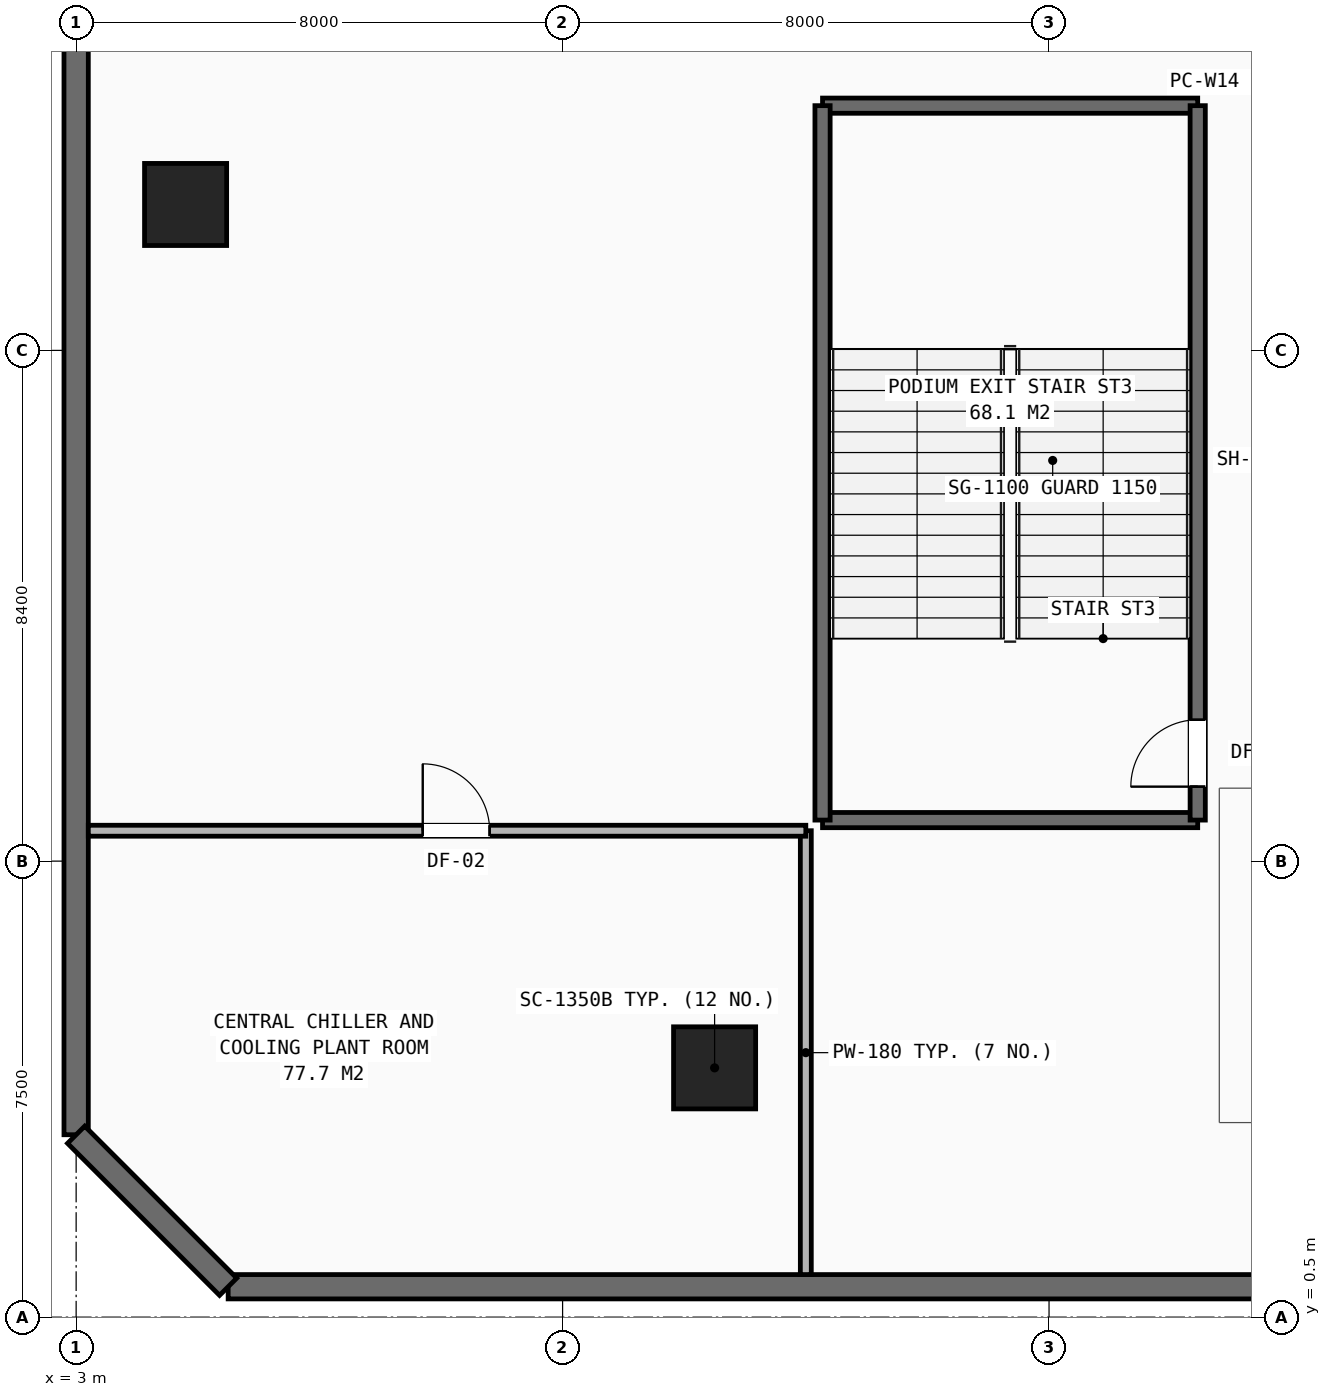
"""IFC4 building model, lengths in metres.
Left out: names, types, materials, properties, quantities, classifications, styles, units other than length and angle.
Written with IfcOpenShell. Run it as: python <this file> out.ifc"""

import sys

from ifc_helpers import new_model, si_unit, direction, frame, frame_2d, origin, origin_2d, place, context, subcontext, project, spatial, rectangle, hollow_rectangle, extrude, element, fill, save


model = new_model("IFC4")
c1 = context("Model", 3, precision=1e-05, world=origin(), true_north=direction((0.0, 1.0)))
c2 = subcontext(c1, "Body", "Model", "MODEL_VIEW")
j1 = project(units=[si_unit("LENGTHUNIT", "METRE"), si_unit("PLANEANGLEUNIT", "RADIAN")], contexts=[c1])
p1 = place(None, origin())
s1 = spatial("IfcSite", under=j1, at=p1, CompositionType="ELEMENT")
p2 = place(p1, origin())
s2 = spatial("IfcBuilding", under=s1, at=p2, CompositionType="ELEMENT")
p3 = place(p2, frame((0.0, 0.0, -10.0)))
s3 = spatial("IfcBuildingStorey", under=s2, at=p3, CompositionType="ELEMENT", Elevation=-10.0)
for number, where, z_axis, x_axis in (
    (1, (13.5, 4.6, 0.0), (0.0, 0.0, 1.0), (1.0, 0.0, 0.0)),
    (2, (4.8, 18.8, 0.0), (0.0, 0.0, 1.0), (1.0, 0.0, 0.0)),
):
    element("IfcColumn", number, at=place(p3, frame(where, z_axis=z_axis, x_axis=x_axis)), inside=s3, PredefinedType="COLUMN", context=c2, shape_type="SweptSolid", body=[
        extrude(hollow_rectangle(XDim=1.35, YDim=1.35, WallThickness=0.085, at=origin_2d()), origin(), (0.0, 0.0, 1.0), 5.0),
    ])
p4 = place(p3, frame((5.5, 1.0, 0.0), z_axis=(0.0, 0.0, 1.0), x_axis=(1.0, 0.0, 0.0)))
e3 = element("IfcWall", 3, at=p4, inside=s3, PredefinedType="USERDEFINED", context=c2, shape_type="SweptSolid", body=[
    extrude(rectangle(XDim=69.0, YDim=0.4, at=frame_2d((34.5, 0.0))), origin(), (0.0, 0.0, 1.0), 4.64),
])
p5 = place(p3, frame((3.0, 51.5, 0.0), z_axis=(0.0, 0.0, 1.0), x_axis=(0.0, -1.0, 0.0)))
e4 = element("IfcWall", 4, at=p5, inside=s3, PredefinedType="USERDEFINED", context=c2, shape_type="SweptSolid", body=[
    extrude(rectangle(XDim=48.0, YDim=0.4, at=frame_2d((24.0, 0.0))), origin(), (0.0, 0.0, 1.0), 4.64),
])
p6 = place(p3, frame((3.0, 3.5, 0.0), z_axis=(0.0, 0.0, 1.0), x_axis=(0.707106781187, -0.707106781187, 0.0)))
e5 = element("IfcWall", 5, at=p6, inside=s3, PredefinedType="USERDEFINED", context=c2, shape_type="SweptSolid", body=[
    extrude(rectangle(XDim=3.536, YDim=0.4, at=frame_2d((1.768, 0.0))), origin(), (0.0, 0.0, 1.0), 4.64),
])
for number, where, z_axis, x_axis in (
    (6, (15.275, 20.425, 0.0), (0.0, 0.0, 1.0), (1.0, 0.0, 0.0)),
    (7, (15.275, 8.675, 0.0), (0.0, 0.0, 1.0), (1.0, 0.0, 0.0)),
):
    element("IfcWall", number, at=place(p3, frame(where, z_axis=z_axis, x_axis=x_axis)), inside=s3, PredefinedType="SHEAR", context=c2, shape_type="SweptSolid", body=[
        extrude(rectangle(XDim=6.17, YDim=0.25, at=frame_2d((3.085, 0.0))), origin(), (0.0, 0.0, 1.0), 4.64),
    ])
p7 = place(p3, frame((15.275, 8.675, 0.0), z_axis=(0.0, 0.0, 1.0), x_axis=(0.0, 1.0, 0.0)))
e8 = element("IfcWall", 8, at=p7, inside=s3, PredefinedType="SHEAR", context=c2, shape_type="SweptSolid", body=[
    extrude(rectangle(XDim=11.75, YDim=0.25, at=frame_2d((5.875, 0.0))), origin(), (0.0, 0.0, 1.0), 4.64),
])
p8 = place(p3, frame((21.445, 8.675, 0.0), z_axis=(0.0, 0.0, 1.0), x_axis=(0.0, 1.0, 0.0)))
e9 = element("IfcWall", 9, at=p8, inside=s3, PredefinedType="SHEAR", context=c2, shape_type="SweptSolid", body=[
    extrude(rectangle(XDim=11.75, YDim=0.25, at=frame_2d((5.875, 0.0))), origin(), (0.0, 0.0, 1.0), 4.64),
])
p9 = place(p8, frame((0.55, 0.0, 0.0)))
e10 = element("IfcOpeningElement", 10, at=p9, cuts=e9, PredefinedType="OPENING", context=c2, shape_type="SweptSolid", body=[
    extrude(rectangle(XDim=1.1, YDim=2.15, at=frame_2d((0.55, 1.075))), frame((0.0, 0.135, 0.0), z_axis=(0.0, -1.0, 0.0), x_axis=(1.0, 0.0, 0.0)), (0.0, 0.0, 1.0), 0.27),
])
p10 = place(p3, frame((15.0, 1.2, 0.0), z_axis=(0.0, 0.0, 1.0), x_axis=(0.0, 1.0, 0.0)))
e11 = element("IfcWall", 11, at=p10, inside=s3, PredefinedType="PARTITIONING", context=c2, shape_type="SweptSolid", body=[
    extrude(rectangle(XDim=7.3, YDim=0.18, at=frame_2d((3.65, 0.0))), origin(), (0.0, 0.0, 1.0), 3.851),
])
p11 = place(p3, frame((3.2, 8.5, 0.0), z_axis=(0.0, 0.0, 1.0), x_axis=(1.0, 0.0, 0.0)))
e12 = element("IfcWall", 12, at=p11, inside=s3, PredefinedType="PARTITIONING", context=c2, shape_type="SweptSolid", body=[
    extrude(rectangle(XDim=11.8, YDim=0.18, at=frame_2d((5.9, 0.0))), origin(), (0.0, 0.0, 1.0), 3.851),
])
p12 = place(p11, frame((5.5, 0.0, 0.0)))
e13 = element("IfcOpeningElement", 13, at=p12, cuts=e12, PredefinedType="OPENING", context=c2, shape_type="SweptSolid", body=[
    extrude(rectangle(XDim=1.1, YDim=2.15, at=frame_2d((0.55, 1.075))), frame((0.0, 0.1, 0.0), z_axis=(0.0, -1.0, 0.0), x_axis=(1.0, 0.0, 0.0)), (0.0, 0.0, 1.0), 0.2),
])
p13 = place(p12, origin())
e14 = element("IfcDoor", 14, at=p13, inside=s3, OperationType="SINGLE_SWING_LEFT", PredefinedType="DOOR", context=c2, shape_type="SweptSolid", body=[
    extrude(rectangle(XDim=1.1, YDim=2.15, at=frame_2d((0.55, 1.075))), frame((0.0, 0.025, 0.0), z_axis=(0.0, -1.0, 0.0), x_axis=(1.0, 0.0, 0.0)), (0.0, 0.0, 1.0), 0.05),
])
fill(e13, e14)
p14 = place(p9, origin())
e15 = element("IfcDoor", 15, at=p14, inside=s3, OperationType="SINGLE_SWING_LEFT", PredefinedType="DOOR", context=c2, shape_type="SweptSolid", body=[
    extrude(rectangle(XDim=1.1, YDim=2.15, at=frame_2d((0.55, 1.075))), frame((0.0, 0.025, 0.0), z_axis=(0.0, -1.0, 0.0), x_axis=(1.0, 0.0, 0.0)), (0.0, 0.0, 1.0), 0.05),
])
fill(e10, e15)
save(model, sys.argv[1])
